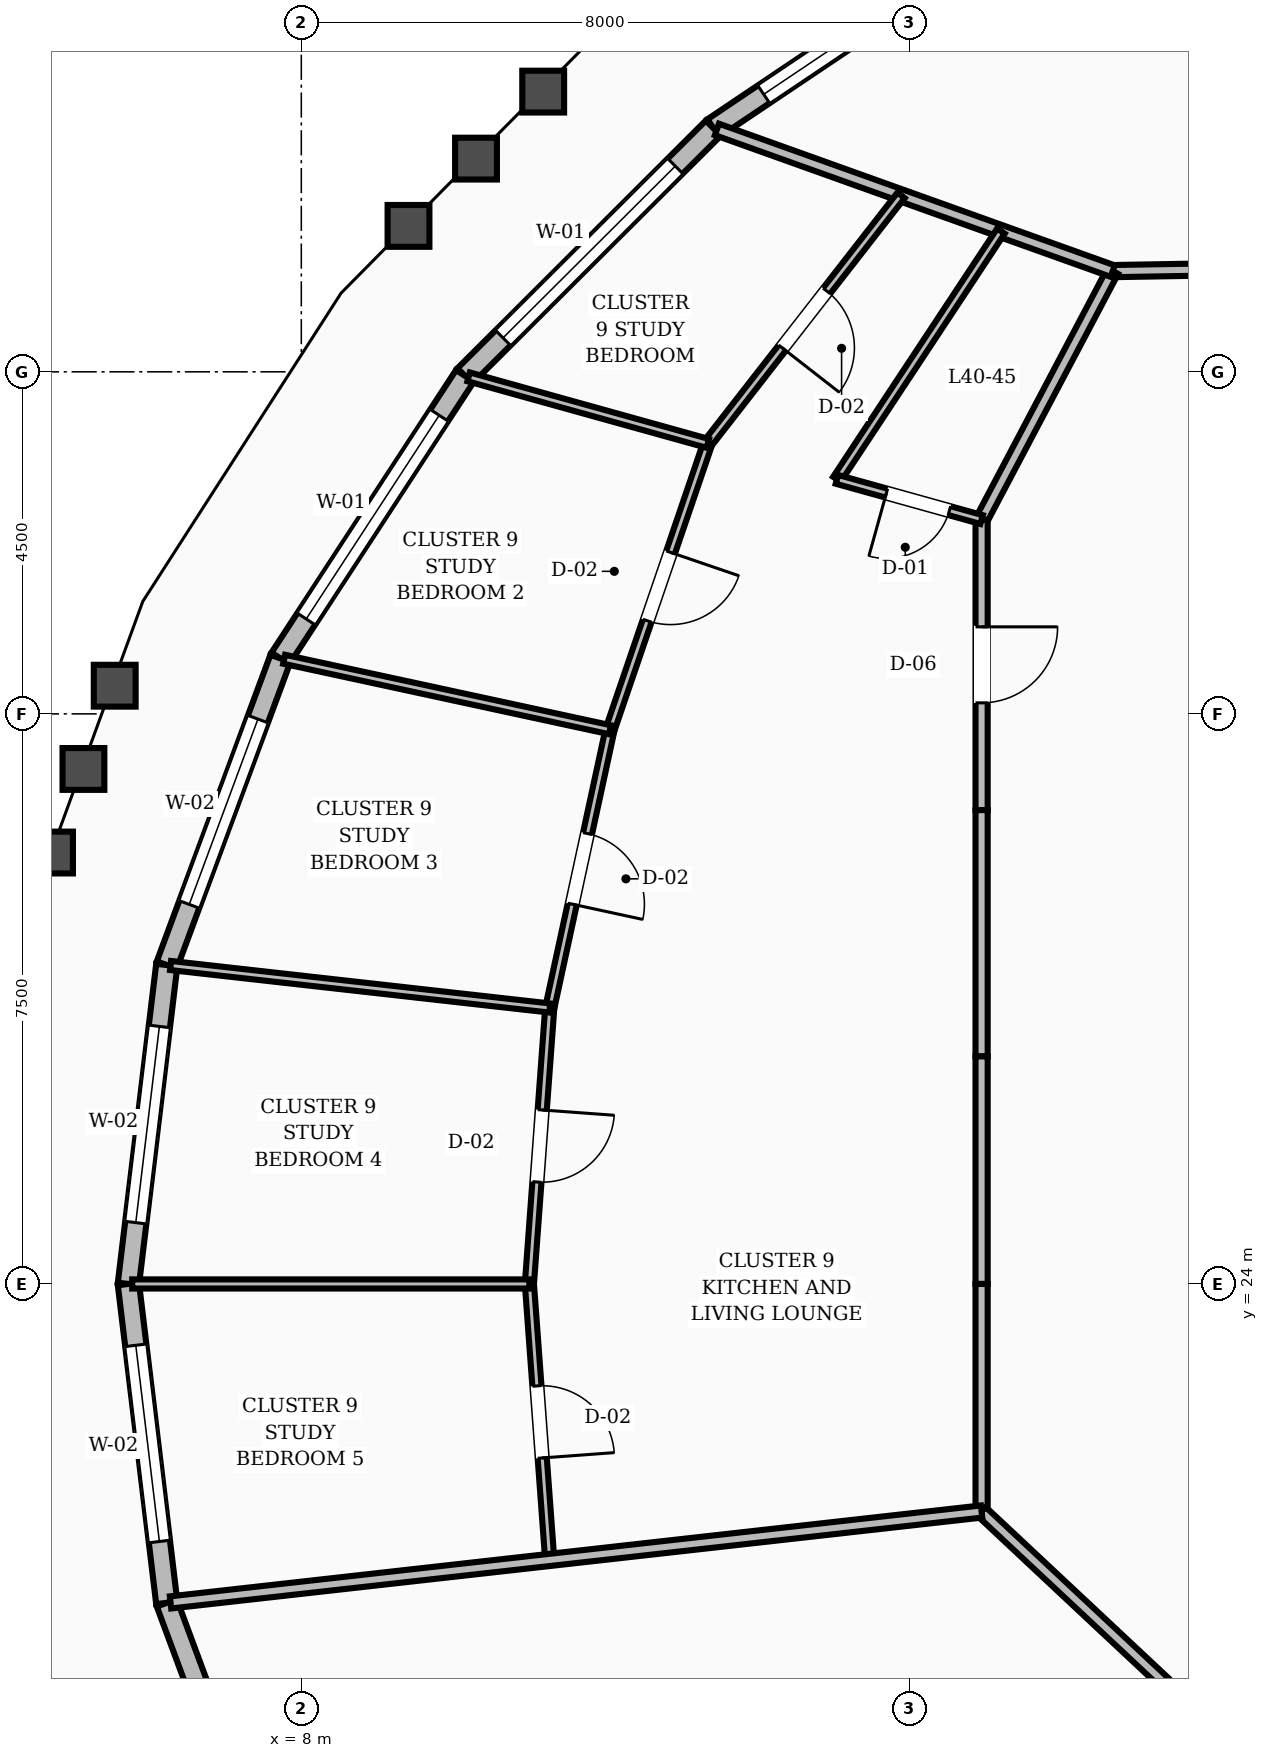
"""IFC4 building model, lengths in metres.
Left out: names, types, materials, properties, quantities, classifications, styles, units other than length and angle.
Written with IfcOpenShell. Run it as: python <this file> out.ifc"""

import sys

from ifc_helpers import new_model, si_unit, direction, frame, frame_2d, origin, place, context, subcontext, project, spatial, rectangle, extrude, element, fill, save


model = new_model("IFC4")
c1 = context("Model", 3, precision=1e-05, world=origin(), true_north=direction((0.0, 1.0)))
c2 = subcontext(c1, "Body", "Model", "MODEL_VIEW")
j1 = project(units=[si_unit("LENGTHUNIT", "METRE"), si_unit("PLANEANGLEUNIT", "RADIAN")], contexts=[c1])
p1 = place(None, origin())
s1 = spatial("IfcSite", under=j1, at=p1, CompositionType="ELEMENT")
p2 = place(p1, origin())
s2 = spatial("IfcBuilding", under=s1, at=p2, CompositionType="ELEMENT")
p3 = place(p2, frame((0.0, 0.0, 156.8)))
s3 = spatial("IfcBuildingStorey", under=s2, at=p3, CompositionType="ELEMENT", Elevation=156.8)
p4 = place(p3, frame((17.402, 41.88, 0.0), z_axis=(0.0, 0.0, 1.0), x_axis=(-0.830095249601, -0.557621624931, 0.0)))
e1 = element("IfcWall", 1, at=p4, inside=s3, PredefinedType="STANDARD", context=c2, shape_type="SweptSolid", body=[
    extrude(rectangle(XDim=4.796, YDim=0.28, at=frame_2d((2.398, 0.0))), origin(), (0.0, 0.0, 1.0), 2.82),
])
p5 = place(p4, frame((0.798, 0.0, 0.8)))
e2 = element("IfcOpeningElement", 2, at=p5, cuts=e1, PredefinedType="OPENING", context=c2, shape_type="SweptSolid", body=[
    extrude(rectangle(XDim=3.2, YDim=1.65, at=frame_2d((1.6, 0.825))), frame((0.0, 0.15, 0.0), z_axis=(0.0, -1.0, 0.0), x_axis=(1.0, 0.0, 0.0)), (0.0, 0.0, 1.0), 0.3),
])
p6 = place(p3, frame((13.421, 39.206, 0.0), z_axis=(0.0, 0.0, 1.0), x_axis=(-0.708084852303, -0.706127355326, 0.0)))
e3 = element("IfcWall", 3, at=p6, inside=s3, PredefinedType="STANDARD", context=c2, shape_type="SweptSolid", body=[
    extrude(rectangle(XDim=4.615, YDim=0.28, at=frame_2d((2.307, 0.0))), origin(), (0.0, 0.0, 1.0), 2.82),
])
p7 = place(p6, frame((0.708, 0.0, 0.8)))
e4 = element("IfcOpeningElement", 4, at=p7, cuts=e3, PredefinedType="OPENING", context=c2, shape_type="SweptSolid", body=[
    extrude(rectangle(XDim=3.2, YDim=1.65, at=frame_2d((1.6, 0.825))), frame((0.0, 0.15, 0.0), z_axis=(0.0, -1.0, 0.0), x_axis=(1.0, 0.0, 0.0)), (0.0, 0.0, 1.0), 0.3),
])
p8 = place(p3, frame((10.153, 35.947, 0.0), z_axis=(0.0, 0.0, 1.0), x_axis=(-0.546834521775, -0.83724070959, 0.0)))
e5 = element("IfcWall", 5, at=p8, inside=s3, PredefinedType="STANDARD", context=c2, shape_type="SweptSolid", body=[
    extrude(rectangle(XDim=4.44, YDim=0.28, at=frame_2d((2.22, 0.0))), origin(), (0.0, 0.0, 1.0), 2.82),
])
p9 = place(p8, frame((0.62, 0.0, 0.8)))
e6 = element("IfcOpeningElement", 6, at=p9, cuts=e5, PredefinedType="OPENING", context=c2, shape_type="SweptSolid", body=[
    extrude(rectangle(XDim=3.2, YDim=1.65, at=frame_2d((1.6, 0.825))), frame((0.0, 0.15, 0.0), z_axis=(0.0, -1.0, 0.0), x_axis=(1.0, 0.0, 0.0)), (0.0, 0.0, 1.0), 0.3),
])
p10 = place(p3, frame((7.725, 32.229, 0.0), z_axis=(0.0, 0.0, 1.0), x_axis=(-0.347513952329, -0.937674811935, 0.0)))
e7 = element("IfcWall", 7, at=p10, inside=s3, PredefinedType="STANDARD", context=c2, shape_type="SweptSolid", body=[
    extrude(rectangle(XDim=4.302, YDim=0.28, at=frame_2d((2.151, 0.0))), origin(), (0.0, 0.0, 1.0), 2.82),
])
p11 = place(p10, frame((0.851, 0.0, 0.8)))
e8 = element("IfcOpeningElement", 8, at=p11, cuts=e7, PredefinedType="OPENING", context=c2, shape_type="SweptSolid", body=[
    extrude(rectangle(XDim=2.6, YDim=1.65, at=frame_2d((1.3, 0.825))), frame((0.0, 0.15, 0.0), z_axis=(0.0, -1.0, 0.0), x_axis=(1.0, 0.0, 0.0)), (0.0, 0.0, 1.0), 0.3),
])
p12 = place(p3, frame((6.23, 28.195, 0.0), z_axis=(0.0, 0.0, 1.0), x_axis=(-0.119482396894, -0.992836319255, 0.0)))
e9 = element("IfcWall", 9, at=p12, inside=s3, PredefinedType="STANDARD", context=c2, shape_type="SweptSolid", body=[
    extrude(rectangle(XDim=4.226, YDim=0.28, at=frame_2d((2.113, 0.0))), origin(), (0.0, 0.0, 1.0), 2.82),
])
p13 = place(p12, frame((0.813, 0.0, 0.8)))
e10 = element("IfcOpeningElement", 10, at=p13, cuts=e9, PredefinedType="OPENING", context=c2, shape_type="SweptSolid", body=[
    extrude(rectangle(XDim=2.6, YDim=1.65, at=frame_2d((1.3, 0.825))), frame((0.0, 0.15, 0.0), z_axis=(0.0, -1.0, 0.0), x_axis=(1.0, 0.0, 0.0)), (0.0, 0.0, 1.0), 0.3),
])
p14 = place(p3, frame((5.725, 24.0, 0.0), z_axis=(0.0, 0.0, 1.0), x_axis=(0.119482396894, -0.992836319255, 0.0)))
e11 = element("IfcWall", 11, at=p14, inside=s3, PredefinedType="STANDARD", context=c2, shape_type="SweptSolid", body=[
    extrude(rectangle(XDim=4.226, YDim=0.28, at=frame_2d((2.113, 0.0))), origin(), (0.0, 0.0, 1.0), 2.82),
])
p15 = place(p14, frame((0.813, 0.0, 0.8)))
e12 = element("IfcOpeningElement", 12, at=p15, cuts=e11, PredefinedType="OPENING", context=c2, shape_type="SweptSolid", body=[
    extrude(rectangle(XDim=2.6, YDim=1.65, at=frame_2d((1.3, 0.825))), frame((0.0, 0.15, 0.0), z_axis=(0.0, -1.0, 0.0), x_axis=(1.0, 0.0, 0.0)), (0.0, 0.0, 1.0), 0.3),
])
p16 = place(p3, frame((6.23, 19.805, 0.0), z_axis=(0.0, 0.0, 1.0), x_axis=(0.347513952329, -0.937674811935, 0.0)))
e13 = element("IfcWall", 13, at=p16, inside=s3, PredefinedType="STANDARD", context=c2, shape_type="SweptSolid", body=[
    extrude(rectangle(XDim=4.302, YDim=0.28, at=frame_2d((2.151, 0.0))), origin(), (0.0, 0.0, 1.0), 2.82),
])
p17 = place(p3, frame((23.046, 37.4, 0.0), z_axis=(0.0, 0.0, 1.0), x_axis=(-0.999853038912, -0.017143528788, 0.0)))
e14 = element("IfcWall", 14, at=p17, inside=s3, PredefinedType="SOLIDWALL", context=c2, shape_type="SweptSolid", body=[
    extrude(rectangle(XDim=4.372, YDim=0.16, at=frame_2d((2.186, 0.0))), origin(), (0.0, 0.0, 1.0), 2.8),
])
p18 = place(p3, frame((18.675, 37.325, 0.0), z_axis=(0.0, 0.0, 1.0), x_axis=(-0.466737093093, -0.884396113702, 0.0)))
e15 = element("IfcWall", 15, at=p18, inside=s3, PredefinedType="SOLIDWALL", context=c2, shape_type="SweptSolid", body=[
    extrude(rectangle(XDim=3.696, YDim=0.16, at=frame_2d((1.848, 0.0))), origin(), (0.0, 0.0, 1.0), 2.8),
])
p19 = place(p3, frame((16.95, 34.056, 0.0), z_axis=(0.0, 0.0, 1.0), x_axis=(0.0, -1.0, 0.0)))
e16 = element("IfcWall", 16, at=p19, inside=s3, PredefinedType="SOLIDWALL", context=c2, shape_type="SweptSolid", body=[
    extrude(rectangle(XDim=3.822, YDim=0.16, at=frame_2d((1.911, 0.0))), origin(), (0.0, 0.0, 1.0), 2.8),
])
p20 = place(p19, frame((1.411, 0.0, 0.0)))
e17 = element("IfcOpeningElement", 17, at=p20, cuts=e16, PredefinedType="OPENING", context=c2, shape_type="SweptSolid", body=[
    extrude(rectangle(XDim=1.0, YDim=2.1, at=frame_2d((0.5, 1.05))), frame((0.0, 0.09, 0.0), z_axis=(0.0, -1.0, 0.0), x_axis=(1.0, 0.0, 0.0)), (0.0, 0.0, 1.0), 0.18),
])
p21 = place(p3, frame((16.95, 30.234, 0.0), z_axis=(0.0, 0.0, 1.0), x_axis=(0.0, -1.0, 0.0)))
e18 = element("IfcWall", 18, at=p21, inside=s3, PredefinedType="SOLIDWALL", context=c2, shape_type="SweptSolid", body=[
    extrude(rectangle(XDim=3.24, YDim=0.16, at=frame_2d((1.62, 0.0))), origin(), (0.0, 0.0, 1.0), 2.8),
])
for number, where, z_axis, x_axis in (
    (19, (16.95, 26.994, 0.0), (0.0, 0.0, 1.0), (0.0, -1.0, 0.0)),
    (20, (16.95, 24.0, 0.0), (0.0, 0.0, 1.0), (0.0, -1.0, 0.0)),
):
    element("IfcWall", number, at=place(p3, frame(where, z_axis=z_axis, x_axis=x_axis)), inside=s3, PredefinedType="SOLIDWALL", context=c2, shape_type="SweptSolid", body=[
        extrude(rectangle(XDim=2.994, YDim=0.16, at=frame_2d((1.497, 0.0))), origin(), (0.0, 0.0, 1.0), 2.8),
    ])
p22 = place(p3, frame((16.95, 21.006, 0.0), z_axis=(0.0, 0.0, 1.0), x_axis=(0.730150682073, -0.683286163674, 0.0)))
e21 = element("IfcWall", 21, at=p22, inside=s3, PredefinedType="SOLIDWALL", context=c2, shape_type="SweptSolid", body=[
    extrude(rectangle(XDim=3.287, YDim=0.16, at=frame_2d((1.644, 0.0))), origin(), (0.0, 0.0, 1.0), 2.8),
])
p23 = place(p3, frame((18.675, 37.325, 0.0), z_axis=(0.0, 0.0, 1.0), x_axis=(-0.941491971832, 0.337035409084, 0.0)))
e22 = element("IfcWall", 22, at=p23, inside=s3, PredefinedType="SOLIDWALL", context=c2, shape_type="SweptSolid", body=[
    extrude(rectangle(XDim=5.531, YDim=0.16, at=frame_2d((2.765, 0.0))), origin(), (0.0, 0.0, 1.0), 2.8),
])
p24 = place(p3, frame((17.204, 37.852, 0.0), z_axis=(0.0, 0.0, 1.0), x_axis=(-0.551082022109, -0.834451079997, 0.0)))
e23 = element("IfcWall", 23, at=p24, inside=s3, PredefinedType="PARTITIONING", context=c2, shape_type="SweptSolid", body=[
    extrude(rectangle(XDim=3.914, YDim=0.12, at=frame_2d((1.957, 0.0))), origin(), (0.0, 0.0, 1.0), 2.8),
])
p25 = place(p3, frame((16.95, 34.056, 0.0), z_axis=(0.0, 0.0, 1.0), x_axis=(-0.963399180879, 0.268070920247, 0.0)))
e24 = element("IfcWall", 24, at=p25, inside=s3, PredefinedType="PARTITIONING", context=c2, shape_type="SweptSolid", body=[
    extrude(rectangle(XDim=1.975, YDim=0.12, at=frame_2d((0.988, 0.0))), origin(), (0.0, 0.0, 1.0), 2.8),
])
p26 = place(p25, frame((0.44, 0.0, 0.0)))
e25 = element("IfcOpeningElement", 25, at=p26, cuts=e24, PredefinedType="OPENING", context=c2, shape_type="SweptSolid", body=[
    extrude(rectangle(XDim=0.86, YDim=2.1, at=frame_2d((0.43, 1.05))), frame((0.0, 0.07, 0.0), z_axis=(0.0, -1.0, 0.0), x_axis=(1.0, 0.0, 0.0)), (0.0, 0.0, 1.0), 0.14),
])
p27 = place(p3, frame((15.89, 38.322, 0.0), z_axis=(0.0, 0.0, 1.0), x_axis=(-0.614589970431, -0.788846733051, 0.0)))
e26 = element("IfcWall", 26, at=p27, inside=s3, PredefinedType="PARTITIONING", context=c2, shape_type="SweptSolid", body=[
    extrude(rectangle(XDim=4.137, YDim=0.12, at=frame_2d((2.069, 0.0))), origin(), (0.0, 0.0, 1.0), 2.8),
])
p28 = place(p27, frame((1.594, 0.0, 0.0)))
e27 = element("IfcOpeningElement", 27, at=p28, cuts=e26, PredefinedType="OPENING", context=c2, shape_type="SweptSolid", body=[
    extrude(rectangle(XDim=0.95, YDim=2.1, at=frame_2d((0.475, 1.05))), frame((0.0, 0.07, 0.0), z_axis=(0.0, -1.0, 0.0), x_axis=(1.0, 0.0, 0.0)), (0.0, 0.0, 1.0), 0.14),
])
p29 = place(p3, frame((13.348, 35.058, 0.0), z_axis=(0.0, 0.0, 1.0), x_axis=(-0.323284519491, -0.946301812033, 0.0)))
e28 = element("IfcWall", 28, at=p29, inside=s3, PredefinedType="PARTITIONING", context=c2, shape_type="SweptSolid", body=[
    extrude(rectangle(XDim=3.981, YDim=0.12, at=frame_2d((1.99, 0.0))), origin(), (0.0, 0.0, 1.0), 2.8),
])
p30 = place(p29, frame((1.515, 0.0, 0.0)))
e29 = element("IfcOpeningElement", 29, at=p30, cuts=e28, PredefinedType="OPENING", context=c2, shape_type="SweptSolid", body=[
    extrude(rectangle(XDim=0.95, YDim=2.1, at=frame_2d((0.475, 1.05))), frame((0.0, 0.07, 0.0), z_axis=(0.0, -1.0, 0.0), x_axis=(1.0, 0.0, 0.0)), (0.0, 0.0, 1.0), 0.14),
])
p31 = place(p3, frame((13.348, 35.058, 0.0), z_axis=(0.0, 0.0, 1.0), x_axis=(-0.963396785762, 0.268079527721, 0.0)))
e30 = element("IfcWall", 30, at=p31, inside=s3, PredefinedType="PARTITIONING", context=c2, shape_type="SweptSolid", body=[
    extrude(rectangle(XDim=3.266, YDim=0.12, at=frame_2d((1.633, 0.0))), origin(), (0.0, 0.0, 1.0), 2.8),
])
p32 = place(p3, frame((12.061, 31.292, 0.0), z_axis=(0.0, 0.0, 1.0), x_axis=(-0.211571761538, -0.977362465884, 0.0)))
e31 = element("IfcWall", 31, at=p32, inside=s3, PredefinedType="PARTITIONING", context=c2, shape_type="SweptSolid", body=[
    extrude(rectangle(XDim=3.746, YDim=0.12, at=frame_2d((1.873, 0.0))), origin(), (0.0, 0.0, 1.0), 2.8),
])
p33 = place(p32, frame((1.398, 0.0, 0.0)))
e32 = element("IfcOpeningElement", 32, at=p33, cuts=e31, PredefinedType="OPENING", context=c2, shape_type="SweptSolid", body=[
    extrude(rectangle(XDim=0.95, YDim=2.1, at=frame_2d((0.475, 1.05))), frame((0.0, 0.07, 0.0), z_axis=(0.0, -1.0, 0.0), x_axis=(1.0, 0.0, 0.0)), (0.0, 0.0, 1.0), 0.14),
])
p34 = place(p3, frame((12.061, 31.292, 0.0), z_axis=(0.0, 0.0, 1.0), x_axis=(-0.97739489365, 0.211421904891, 0.0)))
e33 = element("IfcWall", 33, at=p34, inside=s3, PredefinedType="PARTITIONING", context=c2, shape_type="SweptSolid", body=[
    extrude(rectangle(XDim=4.386, YDim=0.12, at=frame_2d((2.193, 0.0))), origin(), (0.0, 0.0, 1.0), 2.8),
])
p35 = place(p3, frame((11.268, 27.631, 0.0), z_axis=(0.0, 0.0, 1.0), x_axis=(-0.073501140862, -0.997295132993, 0.0)))
e34 = element("IfcWall", 34, at=p35, inside=s3, PredefinedType="PARTITIONING", context=c2, shape_type="SweptSolid", body=[
    extrude(rectangle(XDim=3.64, YDim=0.12, at=frame_2d((1.82, 0.0))), origin(), (0.0, 0.0, 1.0), 2.8),
])
p36 = place(p35, frame((1.345, 0.0, 0.0)))
e35 = element("IfcOpeningElement", 35, at=p36, cuts=e34, PredefinedType="OPENING", context=c2, shape_type="SweptSolid", body=[
    extrude(rectangle(XDim=0.95, YDim=2.1, at=frame_2d((0.475, 1.05))), frame((0.0, 0.07, 0.0), z_axis=(0.0, -1.0, 0.0), x_axis=(1.0, 0.0, 0.0)), (0.0, 0.0, 1.0), 0.14),
])
p37 = place(p3, frame((11.268, 27.631, 0.0), z_axis=(0.0, 0.0, 1.0), x_axis=(-0.993778303092, 0.11137631841, 0.0)))
e36 = element("IfcWall", 36, at=p37, inside=s3, PredefinedType="PARTITIONING", context=c2, shape_type="SweptSolid", body=[
    extrude(rectangle(XDim=5.02, YDim=0.12, at=frame_2d((2.51, 0.0))), origin(), (0.0, 0.0, 1.0), 2.8),
])
p38 = place(p3, frame((11.001, 24.0, 0.0), z_axis=(0.0, 0.0, 1.0), x_axis=(0.073501140862, -0.997295132993, 0.0)))
e37 = element("IfcWall", 37, at=p38, inside=s3, PredefinedType="PARTITIONING", context=c2, shape_type="SweptSolid", body=[
    extrude(rectangle(XDim=3.64, YDim=0.12, at=frame_2d((1.82, 0.0))), origin(), (0.0, 0.0, 1.0), 2.8),
])
p39 = place(p38, frame((1.345, 0.0, 0.0)))
e38 = element("IfcOpeningElement", 38, at=p39, cuts=e37, PredefinedType="OPENING", context=c2, shape_type="SweptSolid", body=[
    extrude(rectangle(XDim=0.95, YDim=2.1, at=frame_2d((0.475, 1.05))), frame((0.0, 0.07, 0.0), z_axis=(0.0, -1.0, 0.0), x_axis=(1.0, 0.0, 0.0)), (0.0, 0.0, 1.0), 0.14),
])
p40 = place(p3, frame((11.001, 24.0, 0.0), z_axis=(0.0, 0.0, 1.0), x_axis=(-1.0, 0.0, 0.0)))
e39 = element("IfcWall", 39, at=p40, inside=s3, PredefinedType="PARTITIONING", context=c2, shape_type="SweptSolid", body=[
    extrude(rectangle(XDim=5.226, YDim=0.12, at=frame_2d((2.613, 0.0))), origin(), (0.0, 0.0, 1.0), 2.8),
])
p41 = place(p3, frame((16.95, 21.006, 0.0), z_axis=(0.0, 0.0, 1.0), x_axis=(-0.993776231557, -0.111394800558, 0.0)))
e40 = element("IfcWall", 40, at=p41, inside=s3, PredefinedType="SOLIDWALL", context=c2, shape_type="SweptSolid", body=[
    extrude(rectangle(XDim=10.737, YDim=0.16, at=frame_2d((5.369, 0.0))), origin(), (0.0, 0.0, 1.0), 2.8),
])
p42 = place(p5, origin())
e41 = element("IfcWindow", 41, at=p42, inside=s3, PartitioningType="SINGLE_PANEL", PredefinedType="WINDOW", context=c2, shape_type="SweptSolid", body=[
    extrude(rectangle(XDim=3.2, YDim=1.65, at=frame_2d((1.6, 0.825))), frame((0.0, 0.03, 0.0), z_axis=(0.0, -1.0, 0.0), x_axis=(1.0, 0.0, 0.0)), (0.0, 0.0, 1.0), 0.06),
])
fill(e2, e41)
p43 = place(p7, origin())
e42 = element("IfcWindow", 42, at=p43, inside=s3, PartitioningType="SINGLE_PANEL", PredefinedType="WINDOW", context=c2, shape_type="SweptSolid", body=[
    extrude(rectangle(XDim=3.2, YDim=1.65, at=frame_2d((1.6, 0.825))), frame((0.0, 0.03, 0.0), z_axis=(0.0, -1.0, 0.0), x_axis=(1.0, 0.0, 0.0)), (0.0, 0.0, 1.0), 0.06),
])
fill(e4, e42)
p44 = place(p9, origin())
e43 = element("IfcWindow", 43, at=p44, inside=s3, PartitioningType="SINGLE_PANEL", PredefinedType="WINDOW", context=c2, shape_type="SweptSolid", body=[
    extrude(rectangle(XDim=3.2, YDim=1.65, at=frame_2d((1.6, 0.825))), frame((0.0, 0.03, 0.0), z_axis=(0.0, -1.0, 0.0), x_axis=(1.0, 0.0, 0.0)), (0.0, 0.0, 1.0), 0.06),
])
fill(e6, e43)
p45 = place(p11, origin())
e44 = element("IfcWindow", 44, at=p45, inside=s3, PartitioningType="SINGLE_PANEL", PredefinedType="WINDOW", context=c2, shape_type="SweptSolid", body=[
    extrude(rectangle(XDim=2.6, YDim=1.65, at=frame_2d((1.3, 0.825))), frame((0.0, 0.03, 0.0), z_axis=(0.0, -1.0, 0.0), x_axis=(1.0, 0.0, 0.0)), (0.0, 0.0, 1.0), 0.06),
])
fill(e8, e44)
p46 = place(p13, origin())
e45 = element("IfcWindow", 45, at=p46, inside=s3, PartitioningType="SINGLE_PANEL", PredefinedType="WINDOW", context=c2, shape_type="SweptSolid", body=[
    extrude(rectangle(XDim=2.6, YDim=1.65, at=frame_2d((1.3, 0.825))), frame((0.0, 0.03, 0.0), z_axis=(0.0, -1.0, 0.0), x_axis=(1.0, 0.0, 0.0)), (0.0, 0.0, 1.0), 0.06),
])
fill(e10, e45)
p47 = place(p15, origin())
e46 = element("IfcWindow", 46, at=p47, inside=s3, PartitioningType="SINGLE_PANEL", PredefinedType="WINDOW", context=c2, shape_type="SweptSolid", body=[
    extrude(rectangle(XDim=2.6, YDim=1.65, at=frame_2d((1.3, 0.825))), frame((0.0, 0.03, 0.0), z_axis=(0.0, -1.0, 0.0), x_axis=(1.0, 0.0, 0.0)), (0.0, 0.0, 1.0), 0.06),
])
fill(e12, e46)
p48 = place(p26, origin())
e47 = element("IfcDoor", 47, at=p48, inside=s3, OperationType="SINGLE_SWING_RIGHT", PredefinedType="DOOR", context=c2, shape_type="SweptSolid", body=[
    extrude(rectangle(XDim=0.86, YDim=2.1, at=frame_2d((0.43, 1.05))), frame((0.0, 0.025, 0.0), z_axis=(0.0, -1.0, 0.0), x_axis=(1.0, 0.0, 0.0)), (0.0, 0.0, 1.0), 0.05),
])
fill(e25, e47)
p49 = place(p20, origin())
e48 = element("IfcDoor", 48, at=p49, inside=s3, OperationType="SINGLE_SWING_LEFT", PredefinedType="DOOR", context=c2, shape_type="SweptSolid", body=[
    extrude(rectangle(XDim=1.0, YDim=2.1, at=frame_2d((0.5, 1.05))), frame((0.0, 0.025, 0.0), z_axis=(0.0, -1.0, 0.0), x_axis=(1.0, 0.0, 0.0)), (0.0, 0.0, 1.0), 0.05),
])
fill(e17, e48)
p50 = place(p28, origin())
e49 = element("IfcDoor", 49, at=p50, inside=s3, OperationType="SINGLE_SWING_RIGHT", PredefinedType="DOOR", context=c2, shape_type="SweptSolid", body=[
    extrude(rectangle(XDim=0.95, YDim=2.1, at=frame_2d((0.475, 1.05))), frame((0.0, 0.025, 0.0), z_axis=(0.0, -1.0, 0.0), x_axis=(1.0, 0.0, 0.0)), (0.0, 0.0, 1.0), 0.05),
])
fill(e27, e49)
p51 = place(p30, origin())
e50 = element("IfcDoor", 50, at=p51, inside=s3, OperationType="SINGLE_SWING_LEFT", PredefinedType="DOOR", context=c2, shape_type="SweptSolid", body=[
    extrude(rectangle(XDim=0.95, YDim=2.1, at=frame_2d((0.475, 1.05))), frame((0.0, 0.025, 0.0), z_axis=(0.0, -1.0, 0.0), x_axis=(1.0, 0.0, 0.0)), (0.0, 0.0, 1.0), 0.05),
])
fill(e29, e50)
p52 = place(p33, origin())
e51 = element("IfcDoor", 51, at=p52, inside=s3, OperationType="SINGLE_SWING_RIGHT", PredefinedType="DOOR", context=c2, shape_type="SweptSolid", body=[
    extrude(rectangle(XDim=0.95, YDim=2.1, at=frame_2d((0.475, 1.05))), frame((0.0, 0.025, 0.0), z_axis=(0.0, -1.0, 0.0), x_axis=(1.0, 0.0, 0.0)), (0.0, 0.0, 1.0), 0.05),
])
fill(e32, e51)
p53 = place(p36, origin())
e52 = element("IfcDoor", 52, at=p53, inside=s3, OperationType="SINGLE_SWING_LEFT", PredefinedType="DOOR", context=c2, shape_type="SweptSolid", body=[
    extrude(rectangle(XDim=0.95, YDim=2.1, at=frame_2d((0.475, 1.05))), frame((0.0, 0.025, 0.0), z_axis=(0.0, -1.0, 0.0), x_axis=(1.0, 0.0, 0.0)), (0.0, 0.0, 1.0), 0.05),
])
fill(e35, e52)
p54 = place(p39, origin())
e53 = element("IfcDoor", 53, at=p54, inside=s3, OperationType="SINGLE_SWING_RIGHT", PredefinedType="DOOR", context=c2, shape_type="SweptSolid", body=[
    extrude(rectangle(XDim=0.95, YDim=2.1, at=frame_2d((0.475, 1.05))), frame((0.0, 0.025, 0.0), z_axis=(0.0, -1.0, 0.0), x_axis=(1.0, 0.0, 0.0)), (0.0, 0.0, 1.0), 0.05),
])
fill(e38, e53)
save(model, sys.argv[1])
